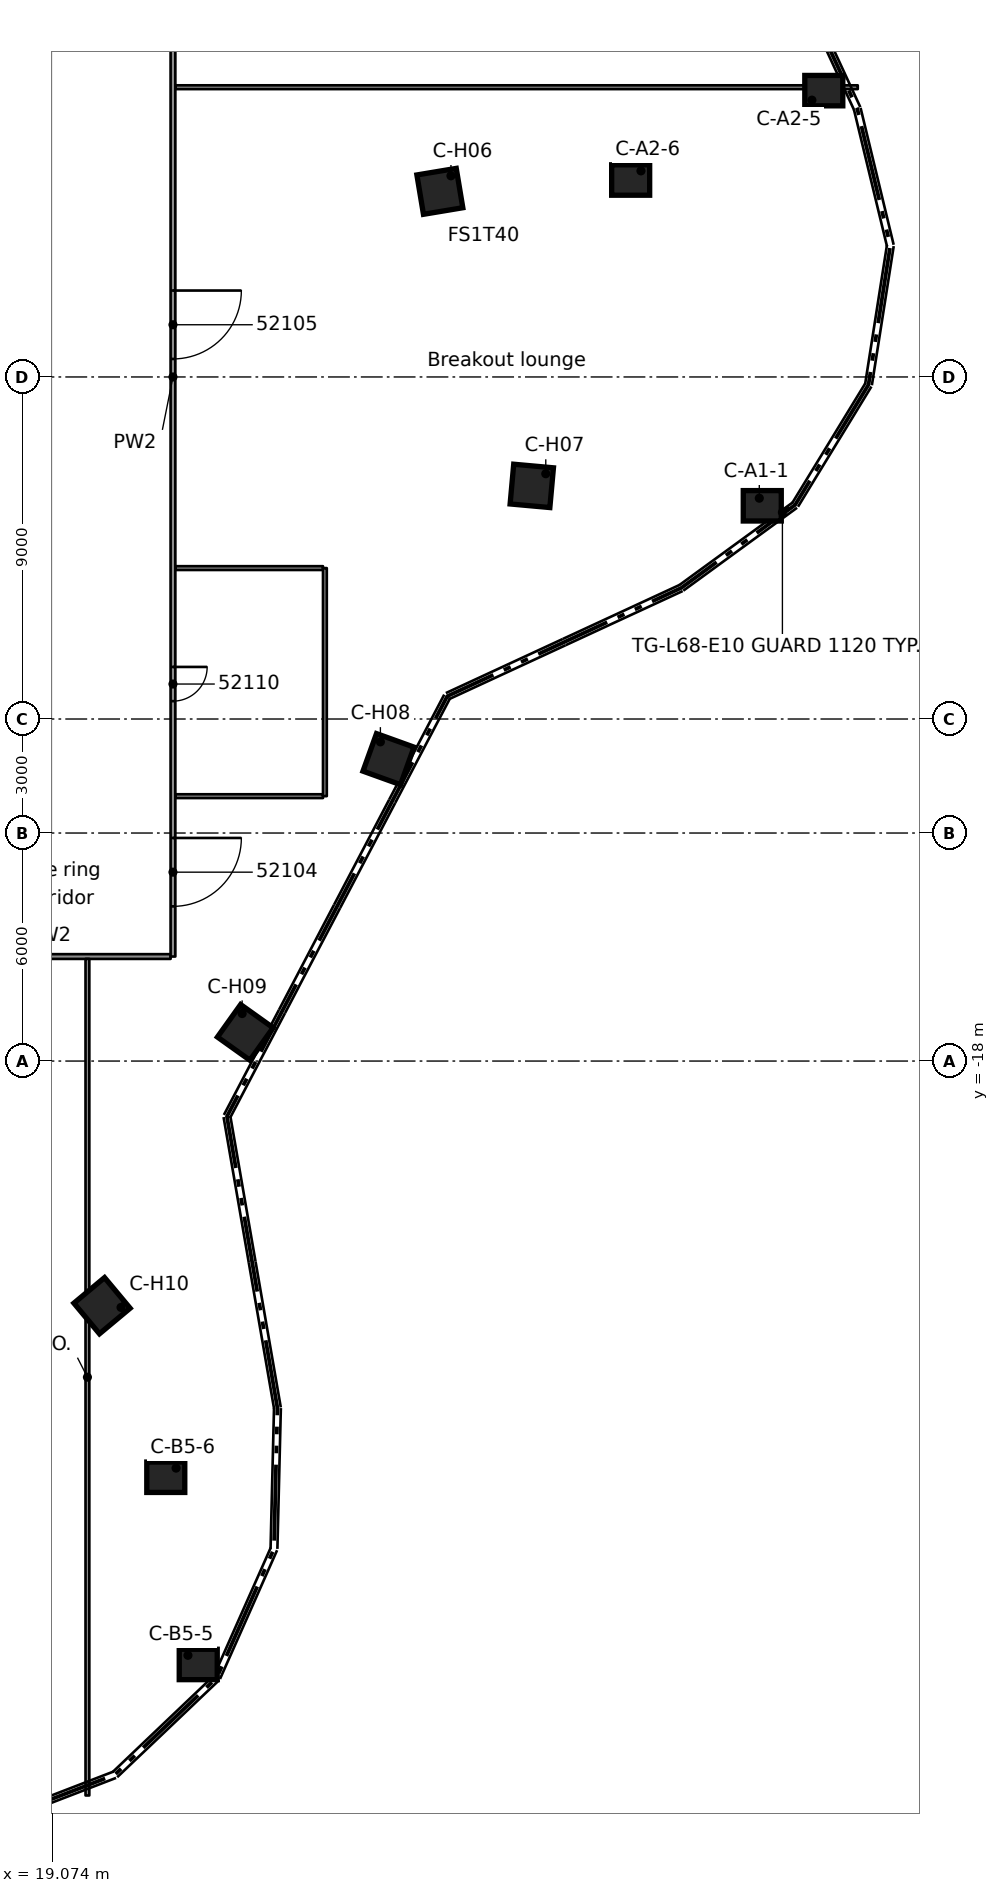
"""IFC4 building model, lengths in metres.
Left out: names, types, materials, properties, quantities, classifications, styles, units other than length and angle.
Written with IfcOpenShell. Run it as: python <this file> out.ifc"""

import sys

from ifc_helpers import new_model, si_unit, direction, frame, frame_2d, origin, origin_2d, place, context, subcontext, project, spatial, rectangle, extrude, element, fill, save


model = new_model("IFC4")
c1 = context("Model", 3, precision=1e-05, world=origin(), true_north=direction((0.0, 1.0)))
c2 = subcontext(c1, "Body", "Model", "MODEL_VIEW")
j1 = project(units=[si_unit("LENGTHUNIT", "METRE"), si_unit("PLANEANGLEUNIT", "RADIAN")], contexts=[c1])
p1 = place(None, origin())
s1 = spatial("IfcSite", under=j1, at=p1, CompositionType="ELEMENT")
p2 = place(p1, origin())
s2 = spatial("IfcBuilding", under=s1, at=p2, CompositionType="ELEMENT")
p3 = place(p2, frame((0.0, 0.0, 257.0)))
s3 = spatial("IfcBuildingStorey", under=s2, at=p3, CompositionType="ELEMENT", Elevation=257.0)
for number, where, z_axis, x_axis in (
    (1, (37.758, -3.39, 0.0), (0.0, 0.0, 1.0), (1.0, 0.0, 0.0)),
    (2, (39.377, 7.534, 0.0), (0.0, 0.0, 1.0), (1.0, 0.0, 0.0)),
    (3, (34.295, 5.182, 0.0), (0.0, 0.0, 1.0), (1.0, 0.0, 0.0)),
    (4, (22.916, -33.877, 0.0), (0.0, 0.0, 1.0), (1.0, 0.0, 0.0)),
    (5, (22.062, -28.951, 0.0), (0.0, 0.0, 1.0), (1.0, 0.0, 0.0)),
):
    element("IfcColumn", number, at=place(p3, frame(where, z_axis=z_axis, x_axis=x_axis)), inside=s3, PredefinedType="COLUMN", context=c2, shape_type="SweptSolid", body=[
        extrude(rectangle(XDim=1.0, YDim=0.8, at=origin_2d()), origin(), (0.0, 0.0, 1.0), 3.5),
    ])
for number, where, z_axis, x_axis in (
    (6, (29.274, 4.884, 0.0), (0.0, 0.0, 1.0), (0.986, 0.165, 0.0)),
    (7, (31.693, -2.866, 0.0), (0.0, 0.0, 1.0), (0.996, -0.09, 0.0)),
    (8, (27.923, -10.056, 0.0), (0.0, 0.0, 1.0), (0.941, -0.339, 0.0)),
    (9, (24.154, -17.246, 0.0), (0.0, 0.0, 1.0), (0.814, -0.581, 0.0)),
    (10, (20.384, -24.437, 0.0), (0.0, 0.0, 1.0), (0.641, -0.768, 0.0)),
):
    element("IfcColumn", number, at=place(p3, frame(where, z_axis=z_axis, x_axis=x_axis)), inside=s3, PredefinedType="COLUMN", context=c2, shape_type="SweptSolid", body=[
        extrude(rectangle(XDim=1.05, YDim=1.05, at=origin_2d()), origin(), (0.0, 0.0, 1.0), 3.5),
    ])
p4 = place(p3, frame((22.189, -15.25, 0.0), z_axis=(0.0, 0.0, 1.0), x_axis=(-1.0, 0.0, 0.0)))
e11 = element("IfcWall", 11, at=p4, inside=s3, PredefinedType="PARTITIONING", context=c2, shape_type="SweptSolid", body=[
    extrude(rectangle(XDim=11.726, YDim=0.125, at=frame_2d((5.863, 0.0))), origin(), (0.0, 0.0, 1.0), 3.08),
])
p5 = place(p4, frame((6.039, 0.0, 0.0)))
e12 = element("IfcOpeningElement", 12, at=p5, cuts=e11, PredefinedType="OPENING", context=c2, shape_type="SweptSolid", body=[
    extrude(rectangle(XDim=1.8, YDim=2.1, at=frame_2d((0.9, 1.05))), frame((0.0, 0.073, 0.0), z_axis=(0.0, -1.0, 0.0), x_axis=(1.0, 0.0, 0.0)), (0.0, 0.0, 1.0), 0.145),
])
for number, where, z_axis, x_axis in (
    (13, (22.314, -11.03, 0.0), (0.0, 0.0, 1.0), (1.0, 0.0, 0.0)),
    (14, (22.314, -5.029, 0.0), (0.0, 0.0, 1.0), (1.0, 0.0, 0.0)),
):
    element("IfcWall", number, at=place(p3, frame(where, z_axis=z_axis, x_axis=x_axis)), inside=s3, PredefinedType="PARTITIONING", context=c2, shape_type="SweptSolid", body=[
        extrude(rectangle(XDim=3.885, YDim=0.1, at=frame_2d((1.942, 0.0))), origin(), (0.0, 0.0, 1.0), 3.08),
    ])
p6 = place(p3, frame((22.314, 7.624, 0.0), z_axis=(0.0, 0.0, 1.0), x_axis=(1.0, 0.0, 0.0)))
e15 = element("IfcWall", 15, at=p6, inside=s3, PredefinedType="PARTITIONING", context=c2, shape_type="SweptSolid", body=[
    extrude(rectangle(XDim=17.957, YDim=0.1, at=frame_2d((8.979, 0.0))), origin(), (0.0, 0.0, 1.0), 3.08),
])
p7 = place(p3, frame((26.249, -11.03, 0.0), z_axis=(0.0, 0.0, 1.0), x_axis=(0.0, 1.0, 0.0)))
e16 = element("IfcWall", 16, at=p7, inside=s3, PredefinedType="PARTITIONING", context=c2, shape_type="SweptSolid", body=[
    extrude(rectangle(XDim=6.001, YDim=0.1, at=frame_2d((3.0, 0.0))), origin(), (0.0, 0.0, 1.0), 3.08),
])
p8 = place(p3, frame((22.251, 15.25, 0.0), z_axis=(0.0, 0.0, 1.0), x_axis=(0.0, -1.0, 0.0)))
e17 = element("IfcWall", 17, at=p8, inside=s3, PredefinedType="PARTITIONING", context=c2, shape_type="SweptSolid", body=[
    extrude(rectangle(XDim=30.5, YDim=0.125, at=frame_2d((15.25, 0.0))), origin(), (0.0, 0.0, 1.0), 3.08),
])
p9 = place(p8, frame((27.38, 0.0, 0.0)))
e18 = element("IfcOpeningElement", 18, at=p9, cuts=e17, PredefinedType="OPENING", context=c2, shape_type="SweptSolid", body=[
    extrude(rectangle(XDim=1.8, YDim=2.1, at=frame_2d((0.9, 1.05))), frame((0.0, 0.073, 0.0), z_axis=(0.0, -1.0, 0.0), x_axis=(1.0, 0.0, 0.0)), (0.0, 0.0, 1.0), 0.145),
])
p10 = place(p8, frame((12.976, 0.0, 0.0)))
e19 = element("IfcOpeningElement", 19, at=p10, cuts=e17, PredefinedType="OPENING", context=c2, shape_type="SweptSolid", body=[
    extrude(rectangle(XDim=1.8, YDim=2.1, at=frame_2d((0.9, 1.05))), frame((0.0, 0.073, 0.0), z_axis=(0.0, -1.0, 0.0), x_axis=(1.0, 0.0, 0.0)), (0.0, 0.0, 1.0), 0.145),
])
p11 = place(p8, frame((3.35, 0.0, 0.0)))
e20 = element("IfcOpeningElement", 20, at=p11, cuts=e17, PredefinedType="OPENING", context=c2, shape_type="SweptSolid", body=[
    extrude(rectangle(XDim=0.9, YDim=2.1, at=frame_2d((0.45, 1.05))), frame((0.0, 0.073, 0.0), z_axis=(0.0, -1.0, 0.0), x_axis=(1.0, 0.0, 0.0)), (0.0, 0.0, 1.0), 0.145),
])
p12 = place(p8, frame((22.88, 0.0, 0.0)))
e21 = element("IfcOpeningElement", 21, at=p12, cuts=e17, PredefinedType="OPENING", context=c2, shape_type="SweptSolid", body=[
    extrude(rectangle(XDim=0.9, YDim=2.1, at=frame_2d((0.45, 1.05))), frame((0.0, 0.073, 0.0), z_axis=(0.0, -1.0, 0.0), x_axis=(1.0, 0.0, 0.0)), (0.0, 0.0, 1.0), 0.145),
])
p13 = place(p3, frame((20.0, -37.324, 0.0), z_axis=(0.0, 0.0, 1.0), x_axis=(0.0, 1.0, 0.0)))
e22 = element("IfcWall", 22, at=p13, inside=s3, PredefinedType="PARTITIONING", context=c2, shape_type="SweptSolid", body=[
    extrude(rectangle(XDim=22.012, YDim=0.1, at=frame_2d((11.006, 0.0))), origin(), (0.0, 0.0, 1.0), 3.08),
])
p14 = place(p9, origin())
e23 = element("IfcDoor", 23, at=p14, inside=s3, OperationType="DOUBLE_DOOR_SINGLE_SWING", PredefinedType="DOOR", context=c2, shape_type="SweptSolid", body=[
    extrude(rectangle(XDim=1.8, YDim=2.1, at=frame_2d((0.9, 1.05))), frame((0.0, 0.025, 0.0), z_axis=(0.0, -1.0, 0.0), x_axis=(1.0, 0.0, 0.0)), (0.0, 0.0, 1.0), 0.05),
])
fill(e18, e23)
p15 = place(p10, origin())
e24 = element("IfcDoor", 24, at=p15, inside=s3, OperationType="DOUBLE_DOOR_SINGLE_SWING", PredefinedType="DOOR", context=c2, shape_type="SweptSolid", body=[
    extrude(rectangle(XDim=1.8, YDim=2.1, at=frame_2d((0.9, 1.05))), frame((0.0, 0.025, 0.0), z_axis=(0.0, -1.0, 0.0), x_axis=(1.0, 0.0, 0.0)), (0.0, 0.0, 1.0), 0.05),
])
fill(e19, e24)
p16 = place(p12, origin())
e25 = element("IfcDoor", 25, at=p16, inside=s3, OperationType="SINGLE_SWING_RIGHT", PredefinedType="DOOR", context=c2, shape_type="SweptSolid", body=[
    extrude(rectangle(XDim=0.9, YDim=2.1, at=frame_2d((0.45, 1.05))), frame((0.0, 0.025, 0.0), z_axis=(0.0, -1.0, 0.0), x_axis=(1.0, 0.0, 0.0)), (0.0, 0.0, 1.0), 0.05),
])
fill(e21, e25)
save(model, sys.argv[1])
